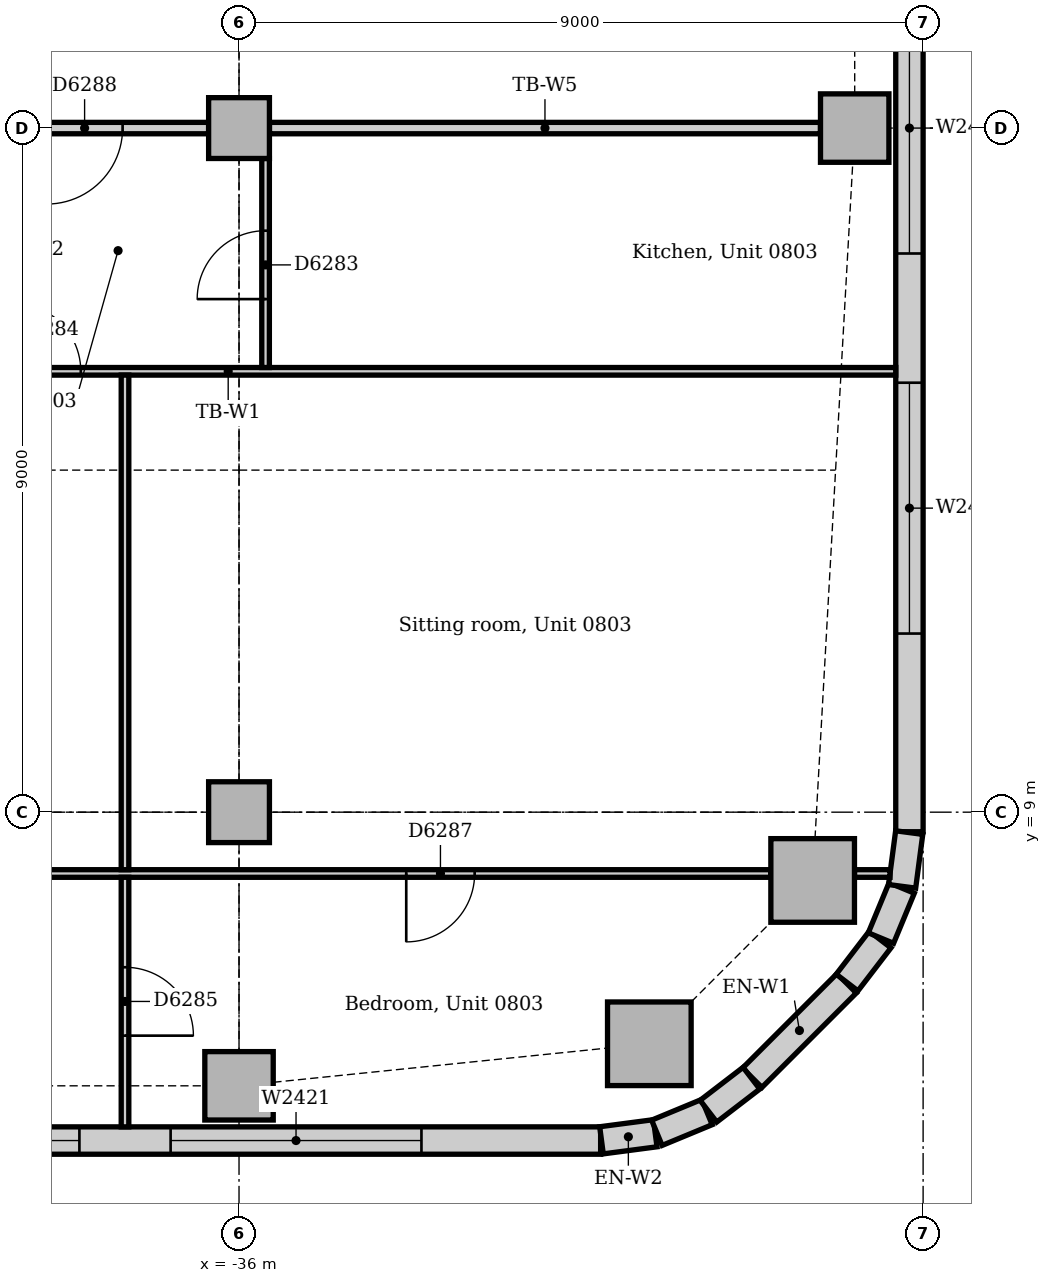
"""IFC4 building model, lengths in metres.
Left out: names, types, materials, properties, quantities, classifications, styles, units other than length and angle.
Written with IfcOpenShell. Run it as: python <this file> out.ifc"""

import sys

from ifc_helpers import new_model, si_unit, direction, frame, frame_2d, origin, origin_2d, place, context, subcontext, project, spatial, rectangle, extrude, element, fill, save


model = new_model("IFC4")
c1 = context("Model", 3, precision=1e-05, world=origin(), true_north=direction((0.0, 1.0)))
c2 = subcontext(c1, "Body", "Model", "MODEL_VIEW")
j1 = project(units=[si_unit("LENGTHUNIT", "METRE"), si_unit("PLANEANGLEUNIT", "RADIAN")], contexts=[c1])
p1 = place(None, origin())
s1 = spatial("IfcSite", under=j1, at=p1, CompositionType="ELEMENT")
p2 = place(p1, origin())
s2 = spatial("IfcBuilding", under=s1, at=p2, CompositionType="ELEMENT")
p3 = place(p2, frame((0.0, 0.0, 38.0)))
s3 = spatial("IfcBuildingStorey", under=s2, at=p3, CompositionType="ELEMENT", Elevation=38.0)
for number, where, z_axis, x_axis in (
    (1, (-30.602, 5.953, 0.0), (0.0, 0.0, 1.0), (1.0, 0.0, 0.0)),
    (2, (-28.453, 8.102, 0.0), (0.0, 0.0, 1.0), (1.0, 0.0, 0.0)),
):
    element("IfcColumn", number, at=place(p3, frame(where, z_axis=z_axis, x_axis=x_axis)), inside=s3, PredefinedType="COLUMN", context=c2, shape_type="SweptSolid", body=[
        extrude(rectangle(XDim=1.1, YDim=1.1, at=origin_2d()), origin(), (0.0, 0.0, 1.0), 3.85),
    ])
for number, where, z_axis, x_axis in (
    (3, (-36.0, 5.4, 0.0), (0.0, 0.0, 1.0), (1.0, 0.0, 0.0)),
    (4, (-27.9, 18.0, 0.0), (0.0, 0.0, 1.0), (1.0, 0.0, 0.0)),
):
    element("IfcColumn", number, at=place(p3, frame(where, z_axis=z_axis, x_axis=x_axis)), inside=s3, PredefinedType="COLUMN", context=c2, shape_type="SweptSolid", body=[
        extrude(rectangle(XDim=0.9, YDim=0.9, at=origin_2d()), origin(), (0.0, 0.0, 1.0), 3.85),
    ])
for number, where, z_axis, x_axis in (
    (5, (-36.0, 9.0, 0.0), (0.0, 0.0, 1.0), (1.0, 0.0, 0.0)),
    (6, (-36.0, 18.0, 0.0), (0.0, 0.0, 1.0), (1.0, 0.0, 0.0)),
):
    element("IfcColumn", number, at=place(p3, frame(where, z_axis=z_axis, x_axis=x_axis)), inside=s3, PredefinedType="COLUMN", context=c2, shape_type="SweptSolid", body=[
        extrude(rectangle(XDim=0.8, YDim=0.8, at=origin_2d()), origin(), (0.0, 0.0, 1.0), 3.85),
    ])
p4 = place(p3, frame((-61.757, 4.68, 0.0), z_axis=(0.0, 0.0, 1.0), x_axis=(1.0, 0.0, 0.0)))
e7 = element("IfcWall", 7, at=p4, inside=s3, PredefinedType="STANDARD", context=c2, shape_type="SweptSolid", body=[
    extrude(rectangle(XDim=30.515, YDim=0.36, at=frame_2d((15.257, 0.0))), origin(), (0.0, 0.0, 1.0), 3.85),
])
p5 = place(p4, frame((2.357, 0.0, 0.9)))
e8 = element("IfcOpeningElement", 8, at=p5, cuts=e7, PredefinedType="OPENING", context=c2, shape_type="SweptSolid", body=[
    extrude(rectangle(XDim=3.3, YDim=1.6, at=frame_2d((1.65, 0.8))), frame((0.0, 0.19, 0.0), z_axis=(0.0, -1.0, 0.0), x_axis=(1.0, 0.0, 0.0)), (0.0, 0.0, 1.0), 0.38),
])
p6 = place(p4, frame((6.857, 0.0, 0.9)))
e9 = element("IfcOpeningElement", 9, at=p6, cuts=e7, PredefinedType="OPENING", context=c2, shape_type="SweptSolid", body=[
    extrude(rectangle(XDim=3.3, YDim=1.6, at=frame_2d((1.65, 0.8))), frame((0.0, 0.19, 0.0), z_axis=(0.0, -1.0, 0.0), x_axis=(1.0, 0.0, 0.0)), (0.0, 0.0, 1.0), 0.38),
])
p7 = place(p4, frame((11.357, 0.0, 0.9)))
e10 = element("IfcOpeningElement", 10, at=p7, cuts=e7, PredefinedType="OPENING", context=c2, shape_type="SweptSolid", body=[
    extrude(rectangle(XDim=3.3, YDim=1.6, at=frame_2d((1.65, 0.8))), frame((0.0, 0.19, 0.0), z_axis=(0.0, -1.0, 0.0), x_axis=(1.0, 0.0, 0.0)), (0.0, 0.0, 1.0), 0.38),
])
p8 = place(p4, frame((15.857, 0.0, 0.9)))
e11 = element("IfcOpeningElement", 11, at=p8, cuts=e7, PredefinedType="OPENING", context=c2, shape_type="SweptSolid", body=[
    extrude(rectangle(XDim=3.3, YDim=1.6, at=frame_2d((1.65, 0.8))), frame((0.0, 0.19, 0.0), z_axis=(0.0, -1.0, 0.0), x_axis=(1.0, 0.0, 0.0)), (0.0, 0.0, 1.0), 0.38),
])
p9 = place(p4, frame((20.357, 0.0, 0.9)))
e12 = element("IfcOpeningElement", 12, at=p9, cuts=e7, PredefinedType="OPENING", context=c2, shape_type="SweptSolid", body=[
    extrude(rectangle(XDim=3.3, YDim=1.6, at=frame_2d((1.65, 0.8))), frame((0.0, 0.19, 0.0), z_axis=(0.0, -1.0, 0.0), x_axis=(1.0, 0.0, 0.0)), (0.0, 0.0, 1.0), 0.38),
])
p10 = place(p4, frame((24.857, 0.0, 0.9)))
e13 = element("IfcOpeningElement", 13, at=p10, cuts=e7, PredefinedType="OPENING", context=c2, shape_type="SweptSolid", body=[
    extrude(rectangle(XDim=3.3, YDim=1.6, at=frame_2d((1.65, 0.8))), frame((0.0, 0.19, 0.0), z_axis=(0.0, -1.0, 0.0), x_axis=(1.0, 0.0, 0.0)), (0.0, 0.0, 1.0), 0.38),
])
p11 = place(p3, frame((-29.249, 5.506, 0.0), z_axis=(0.0, 0.0, 1.0), x_axis=(0.707106781187, 0.707106781187, 0.0)))
e14 = element("IfcWall", 14, at=p11, inside=s3, PredefinedType="STANDARD", context=c2, shape_type="SweptSolid", body=[
    extrude(rectangle(XDim=1.757, YDim=0.36, at=frame_2d((0.879, 0.0))), origin(), (0.0, 0.0, 1.0), 3.85),
])
p12 = place(p3, frame((-27.18, 8.743, 0.0), z_axis=(0.0, 0.0, 1.0), x_axis=(0.0, 1.0, 0.0)))
e15 = element("IfcWall", 15, at=p12, inside=s3, PredefinedType="STANDARD", context=c2, shape_type="SweptSolid", body=[
    extrude(rectangle(XDim=12.257, YDim=0.36, at=frame_2d((6.129, 0.0))), origin(), (0.0, 0.0, 1.0), 3.85),
])
p13 = place(p12, frame((2.607, 0.0, 0.9)))
e16 = element("IfcOpeningElement", 16, at=p13, cuts=e15, PredefinedType="OPENING", context=c2, shape_type="SweptSolid", body=[
    extrude(rectangle(XDim=3.3, YDim=1.6, at=frame_2d((1.65, 0.8))), frame((0.0, 0.19, 0.0), z_axis=(0.0, -1.0, 0.0), x_axis=(1.0, 0.0, 0.0)), (0.0, 0.0, 1.0), 0.38),
])
p14 = place(p12, frame((7.607, 0.0, 0.9)))
e17 = element("IfcOpeningElement", 17, at=p14, cuts=e15, PredefinedType="OPENING", context=c2, shape_type="SweptSolid", body=[
    extrude(rectangle(XDim=3.3, YDim=1.6, at=frame_2d((1.65, 0.8))), frame((0.0, 0.19, 0.0), z_axis=(0.0, -1.0, 0.0), x_axis=(1.0, 0.0, 0.0)), (0.0, 0.0, 1.0), 0.38),
])
for number, where, z_axis, x_axis in (
    (18, (-31.231, 4.683, 0.0), (0.0, 0.0, 1.0), (0.991, 0.131, 0.0)),
    (19, (-30.503, 4.782, 0.0), (0.0, 0.0, 1.0), (0.924, 0.383, 0.0)),
):
    element("IfcWall", number, at=place(p3, frame(where, z_axis=z_axis, x_axis=x_axis)), inside=s3, PredefinedType="STANDARD", context=c2, shape_type="SweptSolid", body=[
        extrude(rectangle(XDim=0.713, YDim=0.36, at=frame_2d((0.356, 0.0))), origin(), (0.0, 0.0, 1.0), 3.85),
    ])
for number, where, z_axis, x_axis in (
    (20, (-29.825, 5.066, 0.0), (0.0, 0.0, 1.0), (0.793, 0.609, 0.0)),
    (21, (-28.0, 6.759, 0.0), (0.0, 0.0, 1.0), (0.609, 0.793, 0.0)),
):
    element("IfcWall", number, at=place(p3, frame(where, z_axis=z_axis, x_axis=x_axis)), inside=s3, PredefinedType="STANDARD", context=c2, shape_type="SweptSolid", body=[
        extrude(rectangle(XDim=0.713, YDim=0.36, at=frame_2d((0.357, 0.0))), origin(), (0.0, 0.0, 1.0), 3.85),
    ])
for number, where, z_axis, x_axis in (
    (22, (-27.555, 7.344, 0.0), (0.0, 0.0, 1.0), (0.383, 0.924, 0.0)),
    (23, (-27.276, 8.024, 0.0), (0.0, 0.0, 1.0), (0.131, 0.991, 0.0)),
):
    element("IfcWall", number, at=place(p3, frame(where, z_axis=z_axis, x_axis=x_axis)), inside=s3, PredefinedType="STANDARD", context=c2, shape_type="SweptSolid", body=[
        extrude(rectangle(XDim=0.713, YDim=0.36, at=frame_2d((0.356, 0.0))), origin(), (0.0, 0.0, 1.0), 3.85),
    ])
p15 = place(p3, frame((-35.6, 18.0, 0.0), z_axis=(0.0, 0.0, 1.0), x_axis=(1.0, 0.0, 0.0)))
e24 = element("IfcWall", 24, at=p15, inside=s3, PredefinedType="PARTITIONING", context=c2, shape_type="SweptSolid", body=[
    extrude(rectangle(XDim=7.25, YDim=0.15, at=frame_2d((3.625, 0.0))), origin(), (0.0, 0.0, 1.0), 3.15),
])
p16 = place(p3, frame((-44.6, 18.0, 0.0), z_axis=(0.0, 0.0, 1.0), x_axis=(1.0, 0.0, 0.0)))
e25 = element("IfcWall", 25, at=p16, inside=s3, PredefinedType="PARTITIONING", context=c2, shape_type="SweptSolid", body=[
    extrude(rectangle(XDim=8.2, YDim=0.15, at=frame_2d((4.1, 0.0))), origin(), (0.0, 0.0, 1.0), 3.15),
])
p17 = place(p16, frame((6.068, 0.0, 0.0)))
e26 = element("IfcOpeningElement", 26, at=p17, cuts=e25, PredefinedType="OPENING", context=c2, shape_type="SweptSolid", body=[
    extrude(rectangle(XDim=1.0, YDim=2.1, at=frame_2d((0.5, 1.05))), frame((0.0, 0.085, 0.0), z_axis=(0.0, -1.0, 0.0), x_axis=(1.0, 0.0, 0.0)), (0.0, 0.0, 1.0), 0.17),
])
p18 = place(p3, frame((-44.925, 14.8, 0.0), z_axis=(0.0, 0.0, 1.0), x_axis=(1.0, 0.0, 0.0)))
e27 = element("IfcWall", 27, at=p18, inside=s3, PredefinedType="PARTITIONING", context=c2, shape_type="SweptSolid", body=[
    extrude(rectangle(XDim=17.565, YDim=0.1, at=frame_2d((8.783, 0.0))), origin(), (0.0, 0.0, 1.0), 3.85),
])
p19 = place(p18, frame((5.943, 0.0, 0.0)))
e28 = element("IfcOpeningElement", 28, at=p19, cuts=e27, PredefinedType="OPENING", context=c2, shape_type="SweptSolid", body=[
    extrude(rectangle(XDim=0.9, YDim=2.1, at=frame_2d((0.45, 1.05))), frame((0.0, 0.06, 0.0), z_axis=(0.0, -1.0, 0.0), x_axis=(1.0, 0.0, 0.0)), (0.0, 0.0, 1.0), 0.12),
])
p20 = place(p3, frame((-44.925, 8.193, 0.0), z_axis=(0.0, 0.0, 1.0), x_axis=(1.0, 0.0, 0.0)))
e29 = element("IfcWall", 29, at=p20, inside=s3, PredefinedType="PARTITIONING", context=c2, shape_type="SweptSolid", body=[
    extrude(rectangle(XDim=15.922, YDim=0.1, at=frame_2d((7.961, 0.0))), origin(), (0.0, 0.0, 1.0), 3.85),
])
p21 = place(p20, frame((3.35, 0.0, 0.0)))
e30 = element("IfcOpeningElement", 30, at=p21, cuts=e29, PredefinedType="OPENING", context=c2, shape_type="SweptSolid", body=[
    extrude(rectangle(XDim=0.9, YDim=2.1, at=frame_2d((0.45, 1.05))), frame((0.0, 0.06, 0.0), z_axis=(0.0, -1.0, 0.0), x_axis=(1.0, 0.0, 0.0)), (0.0, 0.0, 1.0), 0.12),
])
p22 = place(p20, frame((11.125, 0.0, 0.0)))
e31 = element("IfcOpeningElement", 31, at=p22, cuts=e29, PredefinedType="OPENING", context=c2, shape_type="SweptSolid", body=[
    extrude(rectangle(XDim=0.9, YDim=2.1, at=frame_2d((0.45, 1.05))), frame((0.0, 0.06, 0.0), z_axis=(0.0, -1.0, 0.0), x_axis=(1.0, 0.0, 0.0)), (0.0, 0.0, 1.0), 0.12),
])
p23 = place(p3, frame((-27.903, 8.193, 0.0), z_axis=(0.0, 0.0, 1.0), x_axis=(1.0, 0.0, 0.0)))
e32 = element("IfcWall", 32, at=p23, inside=s3, PredefinedType="PARTITIONING", context=c2, shape_type="SweptSolid", body=[
    extrude(rectangle(XDim=0.468, YDim=0.1, at=frame_2d((0.234, 0.0))), origin(), (0.0, 0.0, 1.0), 3.85),
])
p24 = place(p3, frame((-37.5, 8.243, 0.0), z_axis=(0.0, 0.0, 1.0), x_axis=(0.0, 1.0, 0.0)))
e33 = element("IfcWall", 33, at=p24, inside=s3, PredefinedType="PARTITIONING", context=c2, shape_type="SweptSolid", body=[
    extrude(rectangle(XDim=6.507, YDim=0.1, at=frame_2d((3.253, 0.0))), origin(), (0.0, 0.0, 1.0), 3.85),
])
p25 = place(p3, frame((-37.5, 4.86, 0.0), z_axis=(0.0, 0.0, 1.0), x_axis=(0.0, 1.0, 0.0)))
e34 = element("IfcWall", 34, at=p25, inside=s3, PredefinedType="PARTITIONING", context=c2, shape_type="SweptSolid", body=[
    extrude(rectangle(XDim=3.283, YDim=0.1, at=frame_2d((1.642, 0.0))), origin(), (0.0, 0.0, 1.0), 3.85),
])
p26 = place(p25, frame((1.2, 0.0, 0.0)))
e35 = element("IfcOpeningElement", 35, at=p26, cuts=e34, PredefinedType="OPENING", context=c2, shape_type="SweptSolid", body=[
    extrude(rectangle(XDim=0.9, YDim=2.1, at=frame_2d((0.45, 1.05))), frame((0.0, 0.06, 0.0), z_axis=(0.0, -1.0, 0.0), x_axis=(1.0, 0.0, 0.0)), (0.0, 0.0, 1.0), 0.12),
])
p27 = place(p3, frame((-35.651, 14.85, 0.0), z_axis=(0.0, 0.0, 1.0), x_axis=(0.0, 1.0, 0.0)))
e36 = element("IfcWall", 36, at=p27, inside=s3, PredefinedType="PARTITIONING", context=c2, shape_type="SweptSolid", body=[
    extrude(rectangle(XDim=2.75, YDim=0.1, at=frame_2d((1.375, 0.0))), origin(), (0.0, 0.0, 1.0), 3.85),
])
p28 = place(p27, frame((0.9, 0.0, 0.0)))
e37 = element("IfcOpeningElement", 37, at=p28, cuts=e36, PredefinedType="OPENING", context=c2, shape_type="SweptSolid", body=[
    extrude(rectangle(XDim=0.9, YDim=2.1, at=frame_2d((0.45, 1.05))), frame((0.0, 0.06, 0.0), z_axis=(0.0, -1.0, 0.0), x_axis=(1.0, 0.0, 0.0)), (0.0, 0.0, 1.0), 0.12),
])
p29 = place(p9, origin())
e38 = element("IfcWindow", 38, at=p29, inside=s3, PartitioningType="SINGLE_PANEL", PredefinedType="WINDOW", context=c2, shape_type="SweptSolid", body=[
    extrude(rectangle(XDim=3.3, YDim=1.6, at=frame_2d((1.65, 0.8))), frame((0.0, 0.13, 0.0), z_axis=(0.0, -1.0, 0.0), x_axis=(1.0, 0.0, 0.0)), (0.0, 0.0, 1.0), 0.06),
])
fill(e12, e38)
p30 = place(p10, origin())
e39 = element("IfcWindow", 39, at=p30, inside=s3, PartitioningType="SINGLE_PANEL", PredefinedType="WINDOW", context=c2, shape_type="SweptSolid", body=[
    extrude(rectangle(XDim=3.3, YDim=1.6, at=frame_2d((1.65, 0.8))), frame((0.0, 0.13, 0.0), z_axis=(0.0, -1.0, 0.0), x_axis=(1.0, 0.0, 0.0)), (0.0, 0.0, 1.0), 0.06),
])
fill(e13, e39)
p31 = place(p13, origin())
e40 = element("IfcWindow", 40, at=p31, inside=s3, PartitioningType="SINGLE_PANEL", PredefinedType="WINDOW", context=c2, shape_type="SweptSolid", body=[
    extrude(rectangle(XDim=3.3, YDim=1.6, at=frame_2d((1.65, 0.8))), frame((0.0, 0.13, 0.0), z_axis=(0.0, -1.0, 0.0), x_axis=(1.0, 0.0, 0.0)), (0.0, 0.0, 1.0), 0.06),
])
fill(e16, e40)
p32 = place(p14, origin())
e41 = element("IfcWindow", 41, at=p32, inside=s3, PartitioningType="SINGLE_PANEL", PredefinedType="WINDOW", context=c2, shape_type="SweptSolid", body=[
    extrude(rectangle(XDim=3.3, YDim=1.6, at=frame_2d((1.65, 0.8))), frame((0.0, 0.13, 0.0), z_axis=(0.0, -1.0, 0.0), x_axis=(1.0, 0.0, 0.0)), (0.0, 0.0, 1.0), 0.06),
])
fill(e17, e41)
p33 = place(p28, origin())
e42 = element("IfcDoor", 42, at=p33, inside=s3, OperationType="SINGLE_SWING_LEFT", PredefinedType="DOOR", context=c2, shape_type="SweptSolid", body=[
    extrude(rectangle(XDim=0.9, YDim=2.1, at=frame_2d((0.45, 1.05))), frame((0.0, 0.025, 0.0), z_axis=(0.0, -1.0, 0.0), x_axis=(1.0, 0.0, 0.0)), (0.0, 0.0, 1.0), 0.05),
])
fill(e37, e42)
p34 = place(p19, origin())
e43 = element("IfcDoor", 43, at=p34, inside=s3, OperationType="SINGLE_SWING_LEFT", PredefinedType="DOOR", context=c2, shape_type="SweptSolid", body=[
    extrude(rectangle(XDim=0.9, YDim=2.1, at=frame_2d((0.45, 1.05))), frame((0.0, 0.025, 0.0), z_axis=(0.0, -1.0, 0.0), x_axis=(1.0, 0.0, 0.0)), (0.0, 0.0, 1.0), 0.05),
])
fill(e28, e43)
p35 = place(p26, frame((0.9, 0.0, 0.0), z_axis=(0.0, 0.0, 1.0), x_axis=(-1.0, 0.0, 0.0)))
e44 = element("IfcDoor", 44, at=p35, inside=s3, OperationType="SINGLE_SWING_RIGHT", PredefinedType="DOOR", context=c2, shape_type="SweptSolid", body=[
    extrude(rectangle(XDim=0.9, YDim=2.1, at=frame_2d((0.45, 1.05))), frame((0.0, 0.025, 0.0), z_axis=(0.0, -1.0, 0.0), x_axis=(1.0, 0.0, 0.0)), (0.0, 0.0, 1.0), 0.05),
])
fill(e35, e44)
p36 = place(p22, frame((0.9, 0.0, 0.0), z_axis=(0.0, 0.0, 1.0), x_axis=(-1.0, 0.0, 0.0)))
e45 = element("IfcDoor", 45, at=p36, inside=s3, OperationType="SINGLE_SWING_RIGHT", PredefinedType="DOOR", context=c2, shape_type="SweptSolid", body=[
    extrude(rectangle(XDim=0.9, YDim=2.1, at=frame_2d((0.45, 1.05))), frame((0.0, 0.025, 0.0), z_axis=(0.0, -1.0, 0.0), x_axis=(1.0, 0.0, 0.0)), (0.0, 0.0, 1.0), 0.05),
])
fill(e31, e45)
p37 = place(p17, frame((1.0, 0.0, 0.0), z_axis=(0.0, 0.0, 1.0), x_axis=(-1.0, 0.0, 0.0)))
e46 = element("IfcDoor", 46, at=p37, inside=s3, OperationType="SINGLE_SWING_RIGHT", PredefinedType="DOOR", context=c2, shape_type="SweptSolid", body=[
    extrude(rectangle(XDim=1.0, YDim=2.1, at=frame_2d((0.5, 1.05))), frame((0.0, 0.025, 0.0), z_axis=(0.0, -1.0, 0.0), x_axis=(1.0, 0.0, 0.0)), (0.0, 0.0, 1.0), 0.05),
])
fill(e26, e46)
save(model, sys.argv[1])
